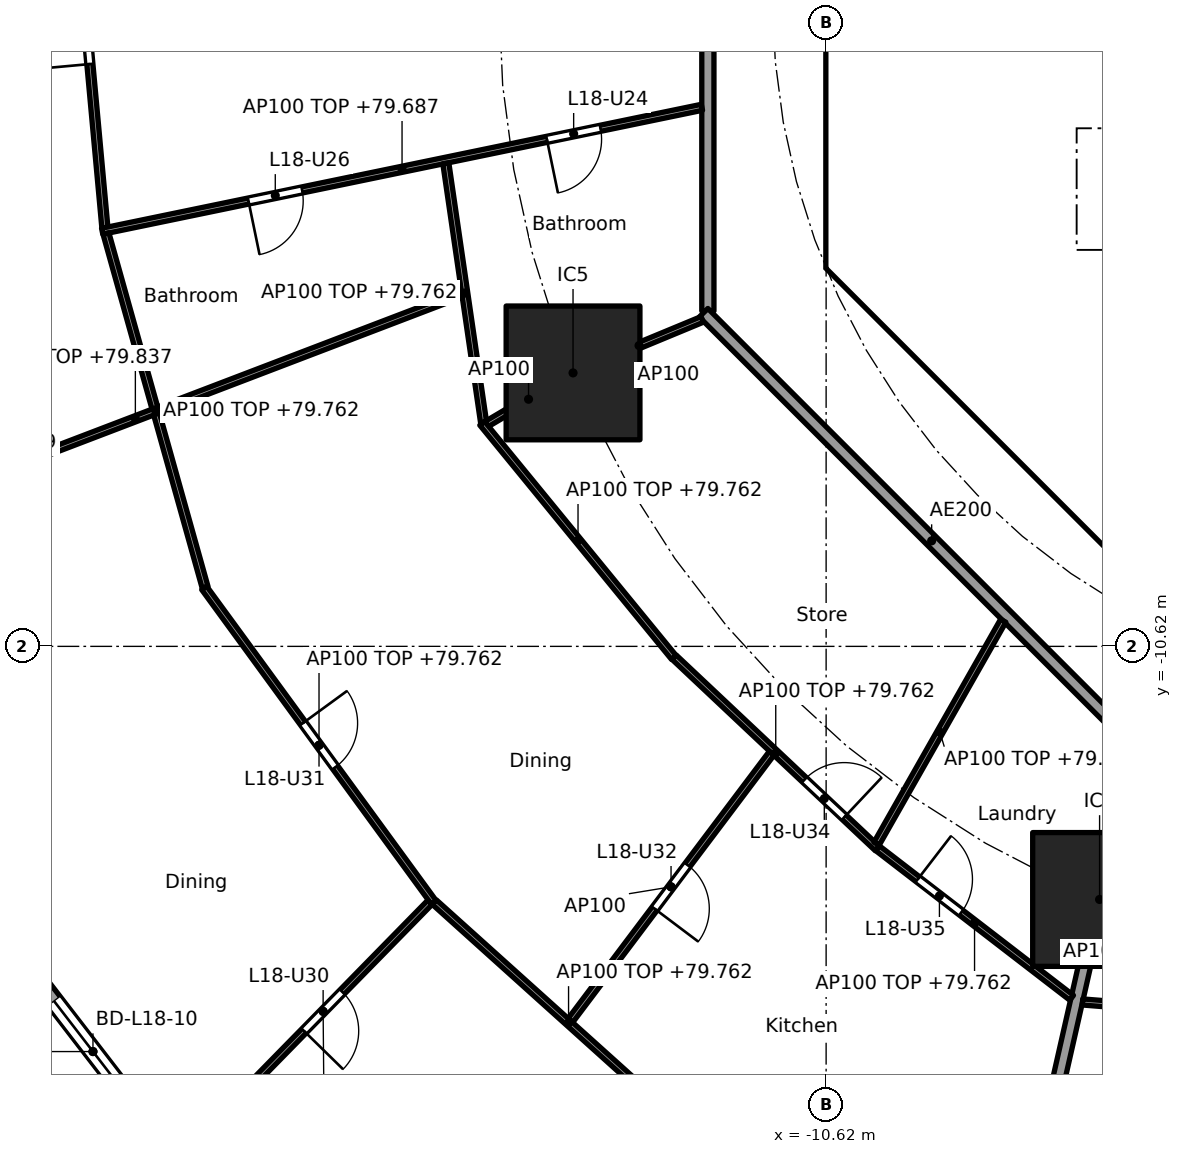
"""IFC4 building model, lengths in metres.
Left out: names, types, materials, properties, quantities, classifications, styles, units other than length and angle.
Written with IfcOpenShell. Run it as: python <this file> out.ifc"""

import sys

from ifc_helpers import new_model, si_unit, direction, frame, frame_2d, origin, origin_2d, place, context, subcontext, project, spatial, polyline, rectangle, outline, extrude, element, fill, save


model = new_model("IFC4")
c1 = context("Model", 3, precision=1e-05, world=origin(), true_north=direction((0.0, 1.0)))
c2 = subcontext(c1, "Body", "Model", "MODEL_VIEW")
j1 = project(units=[si_unit("LENGTHUNIT", "METRE"), si_unit("PLANEANGLEUNIT", "RADIAN")], contexts=[c1])
p1 = place(None, origin())
s1 = spatial("IfcSite", under=j1, at=p1, CompositionType="ELEMENT")
p2 = place(p1, origin())
s2 = spatial("IfcBuilding", under=s1, at=p2, CompositionType="ELEMENT")
p3 = place(p2, frame((0.0, 0.0, 77.0)))
s3 = spatial("IfcBuildingStorey", under=s2, at=p3, CompositionType="ELEMENT", Elevation=77.0)
for number, where, z_axis, x_axis in (
    (1, (-14.782, -6.123, 0.0), (0.0, 0.0, 1.0), (1.0, 0.0, 0.0)),
    (2, (-6.123, -14.782, 0.0), (0.0, 0.0, 1.0), (1.0, 0.0, 0.0)),
):
    element("IfcColumn", number, at=place(p3, frame(where, z_axis=z_axis, x_axis=x_axis)), inside=s3, PredefinedType="COLUMN", context=c2, shape_type="SweptSolid", body=[
        extrude(rectangle(XDim=2.2, YDim=2.2, at=origin_2d()), origin(), (0.0, 0.0, 1.0), 3.7),
    ])
p4 = place(p3, frame((-21.681, -18.576, 0.0), z_axis=(0.0, 0.0, 1.0), x_axis=(-0.61041202934, 0.792084057684, 0.0)))
e3 = element("IfcWall", 3, at=p4, inside=s3, PredefinedType="SOLIDWALL", context=c2, shape_type="SweptSolid", body=[
    extrude(rectangle(XDim=3.263, YDim=0.25, at=frame_2d((1.631, 0.0))), origin(), (0.0, 0.0, 1.0), 3.44),
])
p5 = place(p4, frame((0.582, 0.0, 0.0)))
e4 = element("IfcOpeningElement", 4, at=p5, cuts=e3, PredefinedType="OPENING", context=c2, shape_type="SweptSolid", body=[
    extrude(rectangle(XDim=2.1, YDim=2.4, at=frame_2d((1.05, 1.2))), frame((0.0, 0.135, 0.0), z_axis=(0.0, -1.0, 0.0), x_axis=(1.0, 0.0, 0.0)), (0.0, 0.0, 1.0), 0.27),
])
p6 = place(p3, frame((-10.325, 3.801, 0.0), z_axis=(0.0, 0.0, 1.0), x_axis=(0.0, -1.0, 0.0)))
e5 = element("IfcWall", 5, at=p6, inside=s3, PredefinedType="SHEAR", context=c2, shape_type="SweptSolid", body=[
    extrude(rectangle(XDim=7.602, YDim=0.6, at=frame_2d((3.801, 0.0))), origin(), (0.0, 0.0, 1.0), 3.44),
])
p7 = place(p6, frame((0.651, 0.0, 0.0)))
e6 = element("IfcOpeningElement", 6, at=p7, cuts=e5, PredefinedType="OPENING", context=c2, shape_type="SweptSolid", body=[
    extrude(rectangle(XDim=1.5, YDim=2.1, at=frame_2d((0.75, 1.05))), frame((0.0, 0.31, 0.0), z_axis=(0.0, -1.0, 0.0), x_axis=(1.0, 0.0, 0.0)), (0.0, 0.0, 1.0), 0.62),
])
p8 = place(p6, frame((5.451, 0.0, 0.0)))
e7 = element("IfcOpeningElement", 7, at=p8, cuts=e5, PredefinedType="OPENING", context=c2, shape_type="SweptSolid", body=[
    extrude(rectangle(XDim=1.5, YDim=2.1, at=frame_2d((0.75, 1.05))), frame((0.0, 0.31, 0.0), z_axis=(0.0, -1.0, 0.0), x_axis=(1.0, 0.0, 0.0)), (0.0, 0.0, 1.0), 0.62),
])
p9 = place(p3, frame((-9.988, -4.613, 0.0), z_axis=(0.0, 0.0, 1.0), x_axis=(0.707106781187, -0.707106781187, 0.0)))
e8 = element("IfcWall", 8, at=p9, inside=s3, PredefinedType="SHEAR", context=c2, shape_type="SweptSolid", body=[
    extrude(rectangle(XDim=7.602, YDim=0.6, at=frame_2d((3.801, 0.0))), origin(), (0.0, 0.0, 1.0), 3.44),
])
p10 = place(p9, frame((6.151, 0.0, 0.0)))
e9 = element("IfcOpeningElement", 9, at=p10, cuts=e8, PredefinedType="OPENING", context=c2, shape_type="SweptSolid", body=[
    extrude(rectangle(XDim=1.1, YDim=2.1, at=frame_2d((0.55, 1.05))), frame((0.0, 0.31, 0.0), z_axis=(0.0, -1.0, 0.0), x_axis=(1.0, 0.0, 0.0)), (0.0, 0.0, 1.0), 0.62),
])
p11 = place(p3, frame((-7.0, -7.027, 0.0), z_axis=(0.0, 0.0, 1.0), x_axis=(0.0, 1.0, 0.0)))
e10 = element("IfcWall", 10, at=p11, inside=s3, PredefinedType="PARTITIONING", context=c2, shape_type="SweptSolid", body=[
    extrude(rectangle(XDim=2.927, YDim=0.15, at=frame_2d((1.463, 0.0))), origin(), (0.0, 0.0, 1.0), 3.44),
])
p12 = place(p11, frame((0.976, 0.0, 0.0)))
e11 = element("IfcOpeningElement", 11, at=p12, cuts=e10, PredefinedType="OPENING", context=c2, shape_type="SweptSolid", body=[
    extrude(rectangle(XDim=0.9, YDim=2.1, at=frame_2d((0.45, 1.05))), frame((0.0, 0.085, 0.0), z_axis=(0.0, -1.0, 0.0), x_axis=(1.0, 0.0, 0.0)), (0.0, 0.0, 1.0), 0.17),
])
p13 = place(p3, frame((-6.7, -2.0, 0.0), z_axis=(0.0, 0.0, 1.0), x_axis=(1.0, 0.0, 0.0)))
e12 = element("IfcWall", 12, at=p13, inside=s3, PredefinedType="SOLIDWALL", context=c2, shape_type="SweptSolid", body=[
    extrude(rectangle(XDim=13.4, YDim=0.2, at=frame_2d((6.7, 0.0))), origin(), (0.0, 0.0, 1.0), 3.44),
])
p14 = place(p13, frame((0.65, 0.0, 0.0)))
e13 = element("IfcOpeningElement", 13, at=p14, cuts=e12, PredefinedType="OPENING", context=c2, shape_type="SweptSolid", body=[
    extrude(rectangle(XDim=1.1, YDim=2.1, at=frame_2d((0.55, 1.05))), frame((0.0, 0.11, 0.0), z_axis=(0.0, -1.0, 0.0), x_axis=(1.0, 0.0, 0.0)), (0.0, 0.0, 1.0), 0.22),
])
p15 = place(p13, frame((2.85, 0.0, 0.0)))
e14 = element("IfcOpeningElement", 14, at=p15, cuts=e12, PredefinedType="OPENING", context=c2, shape_type="SweptSolid", body=[
    extrude(rectangle(XDim=1.1, YDim=2.1, at=frame_2d((0.55, 1.05))), frame((0.0, 0.11, 0.0), z_axis=(0.0, -1.0, 0.0), x_axis=(1.0, 0.0, 0.0)), (0.0, 0.0, 1.0), 0.22),
])
p16 = place(p3, origin())
e15 = element("IfcWall", 15, at=p16, inside=s3, PredefinedType="SHEAR", context=c2, shape_type="SweptSolid", body=[
    extrude(outline(polyline([(-10.625, -3.801), (-10.025, -3.801), (-10.025, -4.152), (-9.776, -4.401), (-10.2, -4.825), (-10.625, -4.401), (-10.625, -3.801)])), origin(), (0.0, 0.0, 1.0), 3.44),
])
p17 = place(p3, frame((-10.025, -4.0, 0.0), z_axis=(0.0, 0.0, 1.0), x_axis=(1.0, 0.0, 0.0)))
e16 = element("IfcWall", 16, at=p17, inside=s3, PredefinedType="PARTITIONING", context=c2, shape_type="SweptSolid", body=[
    extrude(rectangle(XDim=3.325, YDim=0.2, at=frame_2d((1.662, 0.0))), origin(), (0.0, 0.0, 1.0), 3.44),
])
p18 = place(p3, origin())
e17 = element("IfcWall", 17, at=p18, inside=s3, PredefinedType="SOLIDWALL", context=c2, shape_type="SweptSolid", body=[
    extrude(outline(polyline([(-6.7, -2.1), (-6.5, -2.1), (-6.5, -4.1), (-4.5, -4.1), (-4.5, -2.1), (-4.3, -2.1), (-4.3, -4.1), (-2.3, -4.1), (-2.3, -2.1), (-2.1, -2.1), (-2.1, -4.1), (-0.1, -4.1), (-0.1, -2.1), (0.1, -2.1), (0.1, -4.1), (2.1, -4.1), (2.1, -2.1), (2.3, -2.1), (2.3, -4.1), (4.3, -4.1), (4.3, -2.1), (4.5, -2.1), (4.5, -4.1), (6.5, -4.1), (6.5, -2.1), (6.7, -2.1), (6.7, -4.3), (-6.7, -4.3), (-6.7, -2.1)])), origin(), (0.0, 0.0, 1.0), 3.44),
])
p19 = place(p3, frame((-5.243, -12.657, 0.0), z_axis=(0.0, 0.0, 1.0), x_axis=(-0.382668627144, -0.923885664896, 0.0)))
e18 = element("IfcWall", 18, at=p19, inside=s3, PredefinedType="PARTITIONING", context=c2, shape_type="SweptSolid", body=[
    extrude(rectangle(XDim=2.2, YDim=0.2, at=frame_2d((1.1, 0.0))), origin(), (0.0, 0.0, 1.0), 3.44),
])
p20 = place(p3, frame((-6.134, -14.831, 0.0), z_axis=(0.0, 0.0, 1.0), x_axis=(-0.221225405869, -0.975222702667, 0.0)))
e19 = element("IfcWall", 19, at=p20, inside=s3, PredefinedType="PARTITIONING", context=c2, shape_type="SweptSolid", body=[
    extrude(rectangle(XDim=11.761, YDim=0.2, at=frame_2d((5.88, 0.0))), origin(), (0.0, 0.0, 1.0), 2.762),
])
p21 = place(p3, frame((-12.565, 5.304, 0.0), z_axis=(0.0, 0.0, 1.0), x_axis=(0.0, -1.0, 0.0)))
e20 = element("IfcWall", 20, at=p21, inside=s3, PredefinedType="PARTITIONING", context=c2, shape_type="SweptSolid", body=[
    extrude(rectangle(XDim=10.409, YDim=0.2, at=frame_2d((5.205, 0.0))), origin(), (0.0, 0.0, 1.0), 3.44),
])
p22 = place(p21, frame((4.804, 0.0, 0.0)))
e21 = element("IfcOpeningElement", 21, at=p22, cuts=e20, PredefinedType="OPENING", context=c2, shape_type="SweptSolid", body=[
    extrude(rectangle(XDim=1.0, YDim=2.1, at=frame_2d((0.5, 1.05))), frame((0.0, 0.11, 0.0), z_axis=(0.0, -1.0, 0.0), x_axis=(1.0, 0.0, 0.0)), (0.0, 0.0, 1.0), 0.22),
])
p23 = place(p3, frame((-12.635, -5.134, 0.0), z_axis=(0.0, 0.0, 1.0), x_axis=(0.707106781187, -0.707106781187, 0.0)))
e22 = element("IfcWall", 22, at=p23, inside=s3, PredefinedType="PARTITIONING", context=c2, shape_type="SweptSolid", body=[
    extrude(rectangle(XDim=10.609, YDim=0.2, at=frame_2d((5.305, 0.0))), origin(), (0.0, 0.0, 1.0), 3.44),
])
p24 = place(p3, frame((-23.057, 2.542, 0.0), z_axis=(0.0, 0.0, 1.0), x_axis=(0.091380945427, -0.995816008514, 0.0)))
e23 = element("IfcWall", 23, at=p24, inside=s3, PredefinedType="PARTITIONING", context=c2, shape_type="SweptSolid", body=[
    extrude(rectangle(XDim=6.302, YDim=0.1, at=frame_2d((3.151, 0.0))), origin(), (0.0, 0.0, 1.0), 2.762),
])
p25 = place(p24, frame((2.701, 0.0, 0.0)))
e24 = element("IfcOpeningElement", 24, at=p25, cuts=e23, PredefinedType="OPENING", context=c2, shape_type="SweptSolid", body=[
    extrude(rectangle(XDim=0.9, YDim=2.1, at=frame_2d((0.45, 1.05))), frame((0.0, 0.06, 0.0), z_axis=(0.0, -1.0, 0.0), x_axis=(1.0, 0.0, 0.0)), (0.0, 0.0, 1.0), 0.12),
])
p26 = place(p3, frame((-12.663, -1.755, 0.0), z_axis=(0.0, 0.0, 1.0), x_axis=(-0.979304677471, -0.202391572657, 0.0)))
e25 = element("IfcWall", 25, at=p26, inside=s3, PredefinedType="PARTITIONING", context=c2, shape_type="SweptSolid", body=[
    extrude(rectangle(XDim=10.071, YDim=0.1, at=frame_2d((5.036, 0.0))), origin(), (0.0, 0.0, 1.0), 2.687),
])
p27 = place(p26, frame((1.704, 0.0, 0.0)))
e26 = element("IfcOpeningElement", 26, at=p27, cuts=e25, PredefinedType="OPENING", context=c2, shape_type="SweptSolid", body=[
    extrude(rectangle(XDim=0.9, YDim=2.1, at=frame_2d((0.45, 1.05))), frame((0.0, 0.06, 0.0), z_axis=(0.0, -1.0, 0.0), x_axis=(1.0, 0.0, 0.0)), (0.0, 0.0, 1.0), 0.12),
])
p28 = place(p26, frame((6.714, 0.0, 0.0)))
e27 = element("IfcOpeningElement", 27, at=p28, cuts=e25, PredefinedType="OPENING", context=c2, shape_type="SweptSolid", body=[
    extrude(rectangle(XDim=0.9, YDim=2.1, at=frame_2d((0.45, 1.05))), frame((0.0, 0.06, 0.0), z_axis=(0.0, -1.0, 0.0), x_axis=(1.0, 0.0, 0.0)), (0.0, 0.0, 1.0), 0.12),
])
p29 = place(p3, frame((-16.874, -2.677, 0.0), z_axis=(0.0, 0.0, 1.0), x_axis=(0.144260658133, -0.989539722555, 0.0)))
e28 = element("IfcWall", 28, at=p29, inside=s3, PredefinedType="PARTITIONING", context=c2, shape_type="SweptSolid", body=[
    extrude(rectangle(XDim=4.309, YDim=0.1, at=frame_2d((2.154, 0.0))), origin(), (0.0, 0.0, 1.0), 2.762),
])
p30 = place(p3, frame((-22.463, -3.832, 0.0), z_axis=(0.0, 0.0, 1.0), x_axis=(0.269797759333, -0.962917010473, 0.0)))
e29 = element("IfcWall", 29, at=p30, inside=s3, PredefinedType="PARTITIONING", context=c2, shape_type="SweptSolid", body=[
    extrude(rectangle(XDim=6.043, YDim=0.1, at=frame_2d((3.021, 0.0))), origin(), (0.0, 0.0, 1.0), 2.762),
])
p31 = place(p3, frame((-16.61, -4.826, 0.0), z_axis=(0.0, 0.0, 1.0), x_axis=(-0.934174502909, -0.356816476798, 0.0)))
e30 = element("IfcWall", 30, at=p31, inside=s3, PredefinedType="PARTITIONING", context=c2, shape_type="SweptSolid", body=[
    extrude(rectangle(XDim=11.496, YDim=0.1, at=frame_2d((5.748, 0.0))), origin(), (0.0, 0.0, 1.0), 2.837),
])
p32 = place(p31, frame((7.993, 0.0, 0.0)))
e31 = element("IfcOpeningElement", 31, at=p32, cuts=e30, PredefinedType="OPENING", context=c2, shape_type="SweptSolid", body=[
    extrude(rectangle(XDim=0.9, YDim=2.1, at=frame_2d((0.45, 1.05))), frame((0.0, 0.06, 0.0), z_axis=(0.0, -1.0, 0.0), x_axis=(1.0, 0.0, 0.0)), (0.0, 0.0, 1.0), 0.12),
])
p33 = place(p3, frame((-12.657, -5.243, 0.0), z_axis=(0.0, 0.0, 1.0), x_axis=(-0.923864733477, -0.382719158442, 0.0)))
e32 = element("IfcWall", 32, at=p33, inside=s3, PredefinedType="PARTITIONING", context=c2, shape_type="SweptSolid", body=[
    extrude(rectangle(XDim=2.25, YDim=0.1, at=frame_2d((1.125, 0.0))), origin(), (0.0, 0.0, 1.0), 3.44),
])
p34 = place(p3, frame((-14.825, -6.148, 0.0), z_axis=(0.0, 0.0, 1.0), x_axis=(-0.860452514841, -0.509530636669, 0.0)))
e33 = element("IfcWall", 33, at=p34, inside=s3, PredefinedType="PARTITIONING", context=c2, shape_type="SweptSolid", body=[
    extrude(rectangle(XDim=1.601, YDim=0.1, at=frame_2d((0.8, 0.0))), origin(), (0.0, 0.0, 1.0), 3.44),
])
p35 = place(p3, frame((-16.277, -6.951, 0.0), z_axis=(0.0, 0.0, 1.0), x_axis=(0.633427340372, -0.773802173988, 0.0)))
e34 = element("IfcWall", 34, at=p35, inside=s3, PredefinedType="PARTITIONING", context=c2, shape_type="SweptSolid", body=[
    extrude(rectangle(XDim=4.979, YDim=0.1, at=frame_2d((2.49, 0.0))), origin(), (0.0, 0.0, 1.0), 2.762),
])
p36 = place(p3, frame((-20.848, -9.658, 0.0), z_axis=(0.0, 0.0, 1.0), x_axis=(0.5895799361, -0.807710033953, 0.0)))
e35 = element("IfcWall", 35, at=p36, inside=s3, PredefinedType="PARTITIONING", context=c2, shape_type="SweptSolid", body=[
    extrude(rectangle(XDim=6.408, YDim=0.1, at=frame_2d((3.204, 0.0))), origin(), (0.0, 0.0, 1.0), 2.762),
])
p37 = place(p36, frame((2.754, 0.0, 0.0)))
e36 = element("IfcOpeningElement", 36, at=p37, cuts=e35, PredefinedType="OPENING", context=c2, shape_type="SweptSolid", body=[
    extrude(rectangle(XDim=0.9, YDim=2.1, at=frame_2d((0.45, 1.05))), frame((0.0, 0.06, 0.0), z_axis=(0.0, -1.0, 0.0), x_axis=(1.0, 0.0, 0.0)), (0.0, 0.0, 1.0), 0.12),
])
p38 = place(p3, frame((-13.118, -10.8, 0.0), z_axis=(0.0, 0.0, 1.0), x_axis=(0.72818280142, -0.685382964273, 0.0)))
e37 = element("IfcWall", 37, at=p38, inside=s3, PredefinedType="PARTITIONING", context=c2, shape_type="SweptSolid", body=[
    extrude(rectangle(XDim=4.586, YDim=0.1, at=frame_2d((2.293, 0.0))), origin(), (0.0, 0.0, 1.0), 2.762),
])
p39 = place(p38, frame((2.94, 0.0, 0.0)))
e38 = element("IfcOpeningElement", 38, at=p39, cuts=e37, PredefinedType="OPENING", context=c2, shape_type="SweptSolid", body=[
    extrude(rectangle(XDim=0.9, YDim=2.1, at=frame_2d((0.45, 1.05))), frame((0.0, 0.06, 0.0), z_axis=(0.0, -1.0, 0.0), x_axis=(1.0, 0.0, 0.0)), (0.0, 0.0, 1.0), 0.12),
])
p40 = place(p3, frame((-17.135, -14.829, 0.0), z_axis=(0.0, 0.0, 1.0), x_axis=(-0.699702869429, -0.714433967917, 0.0)))
e39 = element("IfcWall", 39, at=p40, inside=s3, PredefinedType="PARTITIONING", context=c2, shape_type="SweptSolid", body=[
    extrude(rectangle(XDim=5.022, YDim=0.1, at=frame_2d((2.511, 0.0))), origin(), (0.0, 0.0, 1.0), 2.762),
])
p41 = place(p40, frame((2.061, 0.0, 0.0)))
e40 = element("IfcOpeningElement", 40, at=p41, cuts=e39, PredefinedType="OPENING", context=c2, shape_type="SweptSolid", body=[
    extrude(rectangle(XDim=0.9, YDim=2.1, at=frame_2d((0.45, 1.05))), frame((0.0, 0.06, 0.0), z_axis=(0.0, -1.0, 0.0), x_axis=(1.0, 0.0, 0.0)), (0.0, 0.0, 1.0), 0.12),
])
p42 = place(p3, frame((-17.063, -14.827, 0.0), z_axis=(0.0, 0.0, 1.0), x_axis=(0.743478142868, -0.668760234373, 0.0)))
e41 = element("IfcWall", 41, at=p42, inside=s3, PredefinedType="PARTITIONING", context=c2, shape_type="SweptSolid", body=[
    extrude(rectangle(XDim=5.937, YDim=0.1, at=frame_2d((2.969, 0.0))), origin(), (0.0, 0.0, 1.0), 2.762),
])
p43 = place(p3, frame((-11.515, -12.377, 0.0), z_axis=(0.0, 0.0, 1.0), x_axis=(-0.60163860397, -0.798768420891, 0.0)))
e42 = element("IfcWall", 42, at=p43, inside=s3, PredefinedType="PARTITIONING", context=c2, shape_type="SweptSolid", body=[
    extrude(rectangle(XDim=5.502, YDim=0.1, at=frame_2d((2.751, 0.0))), origin(), (0.0, 0.0, 1.0), 3.44),
])
p44 = place(p43, frame((2.301, 0.0, 0.0)))
e43 = element("IfcOpeningElement", 43, at=p44, cuts=e42, PredefinedType="OPENING", context=c2, shape_type="SweptSolid", body=[
    extrude(rectangle(XDim=0.9, YDim=2.1, at=frame_2d((0.45, 1.05))), frame((0.0, 0.06, 0.0), z_axis=(0.0, -1.0, 0.0), x_axis=(1.0, 0.0, 0.0)), (0.0, 0.0, 1.0), 0.12),
])
p45 = place(p3, frame((-7.707, -10.198, 0.0), z_axis=(0.0, 0.0, 1.0), x_axis=(-0.493986531217, -0.869469554945, 0.0)))
e44 = element("IfcWall", 44, at=p45, inside=s3, PredefinedType="PARTITIONING", context=c2, shape_type="SweptSolid", body=[
    extrude(rectangle(XDim=4.217, YDim=0.1, at=frame_2d((2.109, 0.0))), origin(), (0.0, 0.0, 1.0), 2.687),
])
p46 = place(p3, frame((-9.775, -13.939, 0.0), z_axis=(0.0, 0.0, 1.0), x_axis=(0.792162117554, -0.610310723741, 0.0)))
e45 = element("IfcWall", 45, at=p46, inside=s3, PredefinedType="PARTITIONING", context=c2, shape_type="SweptSolid", body=[
    extrude(rectangle(XDim=4.03, YDim=0.1, at=frame_2d((2.015, 0.0))), origin(), (0.0, 0.0, 1.0), 2.762),
])
p47 = place(p46, frame((0.836, 0.0, 0.0)))
e46 = element("IfcOpeningElement", 46, at=p47, cuts=e45, PredefinedType="OPENING", context=c2, shape_type="SweptSolid", body=[
    extrude(rectangle(XDim=0.9, YDim=2.1, at=frame_2d((0.45, 1.05))), frame((0.0, 0.06, 0.0), z_axis=(0.0, -1.0, 0.0), x_axis=(1.0, 0.0, 0.0)), (0.0, 0.0, 1.0), 0.12),
])
p48 = place(p3, frame((-6.404, -16.468, 0.0), z_axis=(0.0, 0.0, 1.0), x_axis=(0.996818808981, -0.079701079432, 0.0)))
e47 = element("IfcWall", 47, at=p48, inside=s3, PredefinedType="PARTITIONING", context=c2, shape_type="SweptSolid", body=[
    extrude(rectangle(XDim=4.616, YDim=0.1, at=frame_2d((2.308, 0.0))), origin(), (0.0, 0.0, 1.0), 2.762),
])
p49 = place(p5, origin())
e48 = element("IfcDoor", 48, at=p49, inside=s3, OperationType="SLIDING_TO_LEFT", PredefinedType="DOOR", context=c2, shape_type="SweptSolid", body=[
    extrude(rectangle(XDim=2.1, YDim=2.4, at=frame_2d((1.05, 1.2))), frame((0.0, 0.025, 0.0), z_axis=(0.0, -1.0, 0.0), x_axis=(1.0, 0.0, 0.0)), (0.0, 0.0, 1.0), 0.05),
])
fill(e4, e48)
p50 = place(p12, origin())
e49 = element("IfcDoor", 49, at=p50, inside=s3, OperationType="SINGLE_SWING_LEFT", PredefinedType="DOOR", context=c2, shape_type="SweptSolid", body=[
    extrude(rectangle(XDim=0.9, YDim=2.1, at=frame_2d((0.45, 1.05))), frame((0.0, 0.025, 0.0), z_axis=(0.0, -1.0, 0.0), x_axis=(1.0, 0.0, 0.0)), (0.0, 0.0, 1.0), 0.05),
])
fill(e11, e49)
p51 = place(p8, origin())
e50 = element("IfcDoor", 50, at=p51, inside=s3, OperationType="DOUBLE_DOOR_SINGLE_SWING", PredefinedType="DOOR", context=c2, shape_type="SweptSolid", body=[
    extrude(rectangle(XDim=1.5, YDim=2.1, at=frame_2d((0.75, 1.05))), frame((0.0, 0.025, 0.0), z_axis=(0.0, -1.0, 0.0), x_axis=(1.0, 0.0, 0.0)), (0.0, 0.0, 1.0), 0.05),
])
fill(e7, e50)
p52 = place(p27, origin())
e51 = element("IfcDoor", 51, at=p52, inside=s3, OperationType="SINGLE_SWING_RIGHT", PredefinedType="DOOR", context=c2, shape_type="SweptSolid", body=[
    extrude(rectangle(XDim=0.9, YDim=2.1, at=frame_2d((0.45, 1.05))), frame((0.0, 0.025, 0.0), z_axis=(0.0, -1.0, 0.0), x_axis=(1.0, 0.0, 0.0)), (0.0, 0.0, 1.0), 0.05),
])
fill(e26, e51)
p53 = place(p28, origin())
e52 = element("IfcDoor", 52, at=p53, inside=s3, OperationType="SINGLE_SWING_RIGHT", PredefinedType="DOOR", context=c2, shape_type="SweptSolid", body=[
    extrude(rectangle(XDim=0.9, YDim=2.1, at=frame_2d((0.45, 1.05))), frame((0.0, 0.025, 0.0), z_axis=(0.0, -1.0, 0.0), x_axis=(1.0, 0.0, 0.0)), (0.0, 0.0, 1.0), 0.05),
])
fill(e27, e52)
p54 = place(p25, frame((0.9, 0.0, 0.0), x_axis=(-1.0, 0.0, 0.0)))
e53 = element("IfcDoor", 53, at=p54, inside=s3, OperationType="SINGLE_SWING_LEFT", PredefinedType="DOOR", context=c2, shape_type="SweptSolid", body=[
    extrude(rectangle(XDim=0.9, YDim=2.1, at=frame_2d((0.45, 1.05))), frame((0.0, 0.025, 0.0), z_axis=(0.0, -1.0, 0.0), x_axis=(1.0, 0.0, 0.0)), (0.0, 0.0, 1.0), 0.05),
])
fill(e24, e53)
p55 = place(p41, origin())
e54 = element("IfcDoor", 54, at=p55, inside=s3, OperationType="SINGLE_SWING_RIGHT", PredefinedType="DOOR", context=c2, shape_type="SweptSolid", body=[
    extrude(rectangle(XDim=0.9, YDim=2.1, at=frame_2d((0.45, 1.05))), frame((0.0, 0.025, 0.0), z_axis=(0.0, -1.0, 0.0), x_axis=(1.0, 0.0, 0.0)), (0.0, 0.0, 1.0), 0.05),
])
fill(e40, e54)
p56 = place(p37, origin())
e55 = element("IfcDoor", 55, at=p56, inside=s3, OperationType="SINGLE_SWING_LEFT", PredefinedType="DOOR", context=c2, shape_type="SweptSolid", body=[
    extrude(rectangle(XDim=0.9, YDim=2.1, at=frame_2d((0.45, 1.05))), frame((0.0, 0.025, 0.0), z_axis=(0.0, -1.0, 0.0), x_axis=(1.0, 0.0, 0.0)), (0.0, 0.0, 1.0), 0.05),
])
fill(e36, e55)
p57 = place(p44, origin())
e56 = element("IfcDoor", 56, at=p57, inside=s3, OperationType="SINGLE_SWING_RIGHT", PredefinedType="DOOR", context=c2, shape_type="SweptSolid", body=[
    extrude(rectangle(XDim=0.9, YDim=2.1, at=frame_2d((0.45, 1.05))), frame((0.0, 0.025, 0.0), z_axis=(0.0, -1.0, 0.0), x_axis=(1.0, 0.0, 0.0)), (0.0, 0.0, 1.0), 0.05),
])
fill(e43, e56)
p58 = place(p39, origin())
e57 = element("IfcDoor", 57, at=p58, inside=s3, OperationType="SINGLE_SWING_RIGHT", PredefinedType="DOOR", context=c2, shape_type="SweptSolid", body=[
    extrude(rectangle(XDim=0.9, YDim=2.1, at=frame_2d((0.45, 1.05))), frame((0.0, 0.025, 0.0), z_axis=(0.0, -1.0, 0.0), x_axis=(1.0, 0.0, 0.0)), (0.0, 0.0, 1.0), 0.05),
])
fill(e38, e57)
p59 = place(p47, origin())
e58 = element("IfcDoor", 58, at=p59, inside=s3, OperationType="SINGLE_SWING_LEFT", PredefinedType="DOOR", context=c2, shape_type="SweptSolid", body=[
    extrude(rectangle(XDim=0.9, YDim=2.1, at=frame_2d((0.45, 1.05))), frame((0.0, 0.025, 0.0), z_axis=(0.0, -1.0, 0.0), x_axis=(1.0, 0.0, 0.0)), (0.0, 0.0, 1.0), 0.05),
])
fill(e46, e58)
save(model, sys.argv[1])
